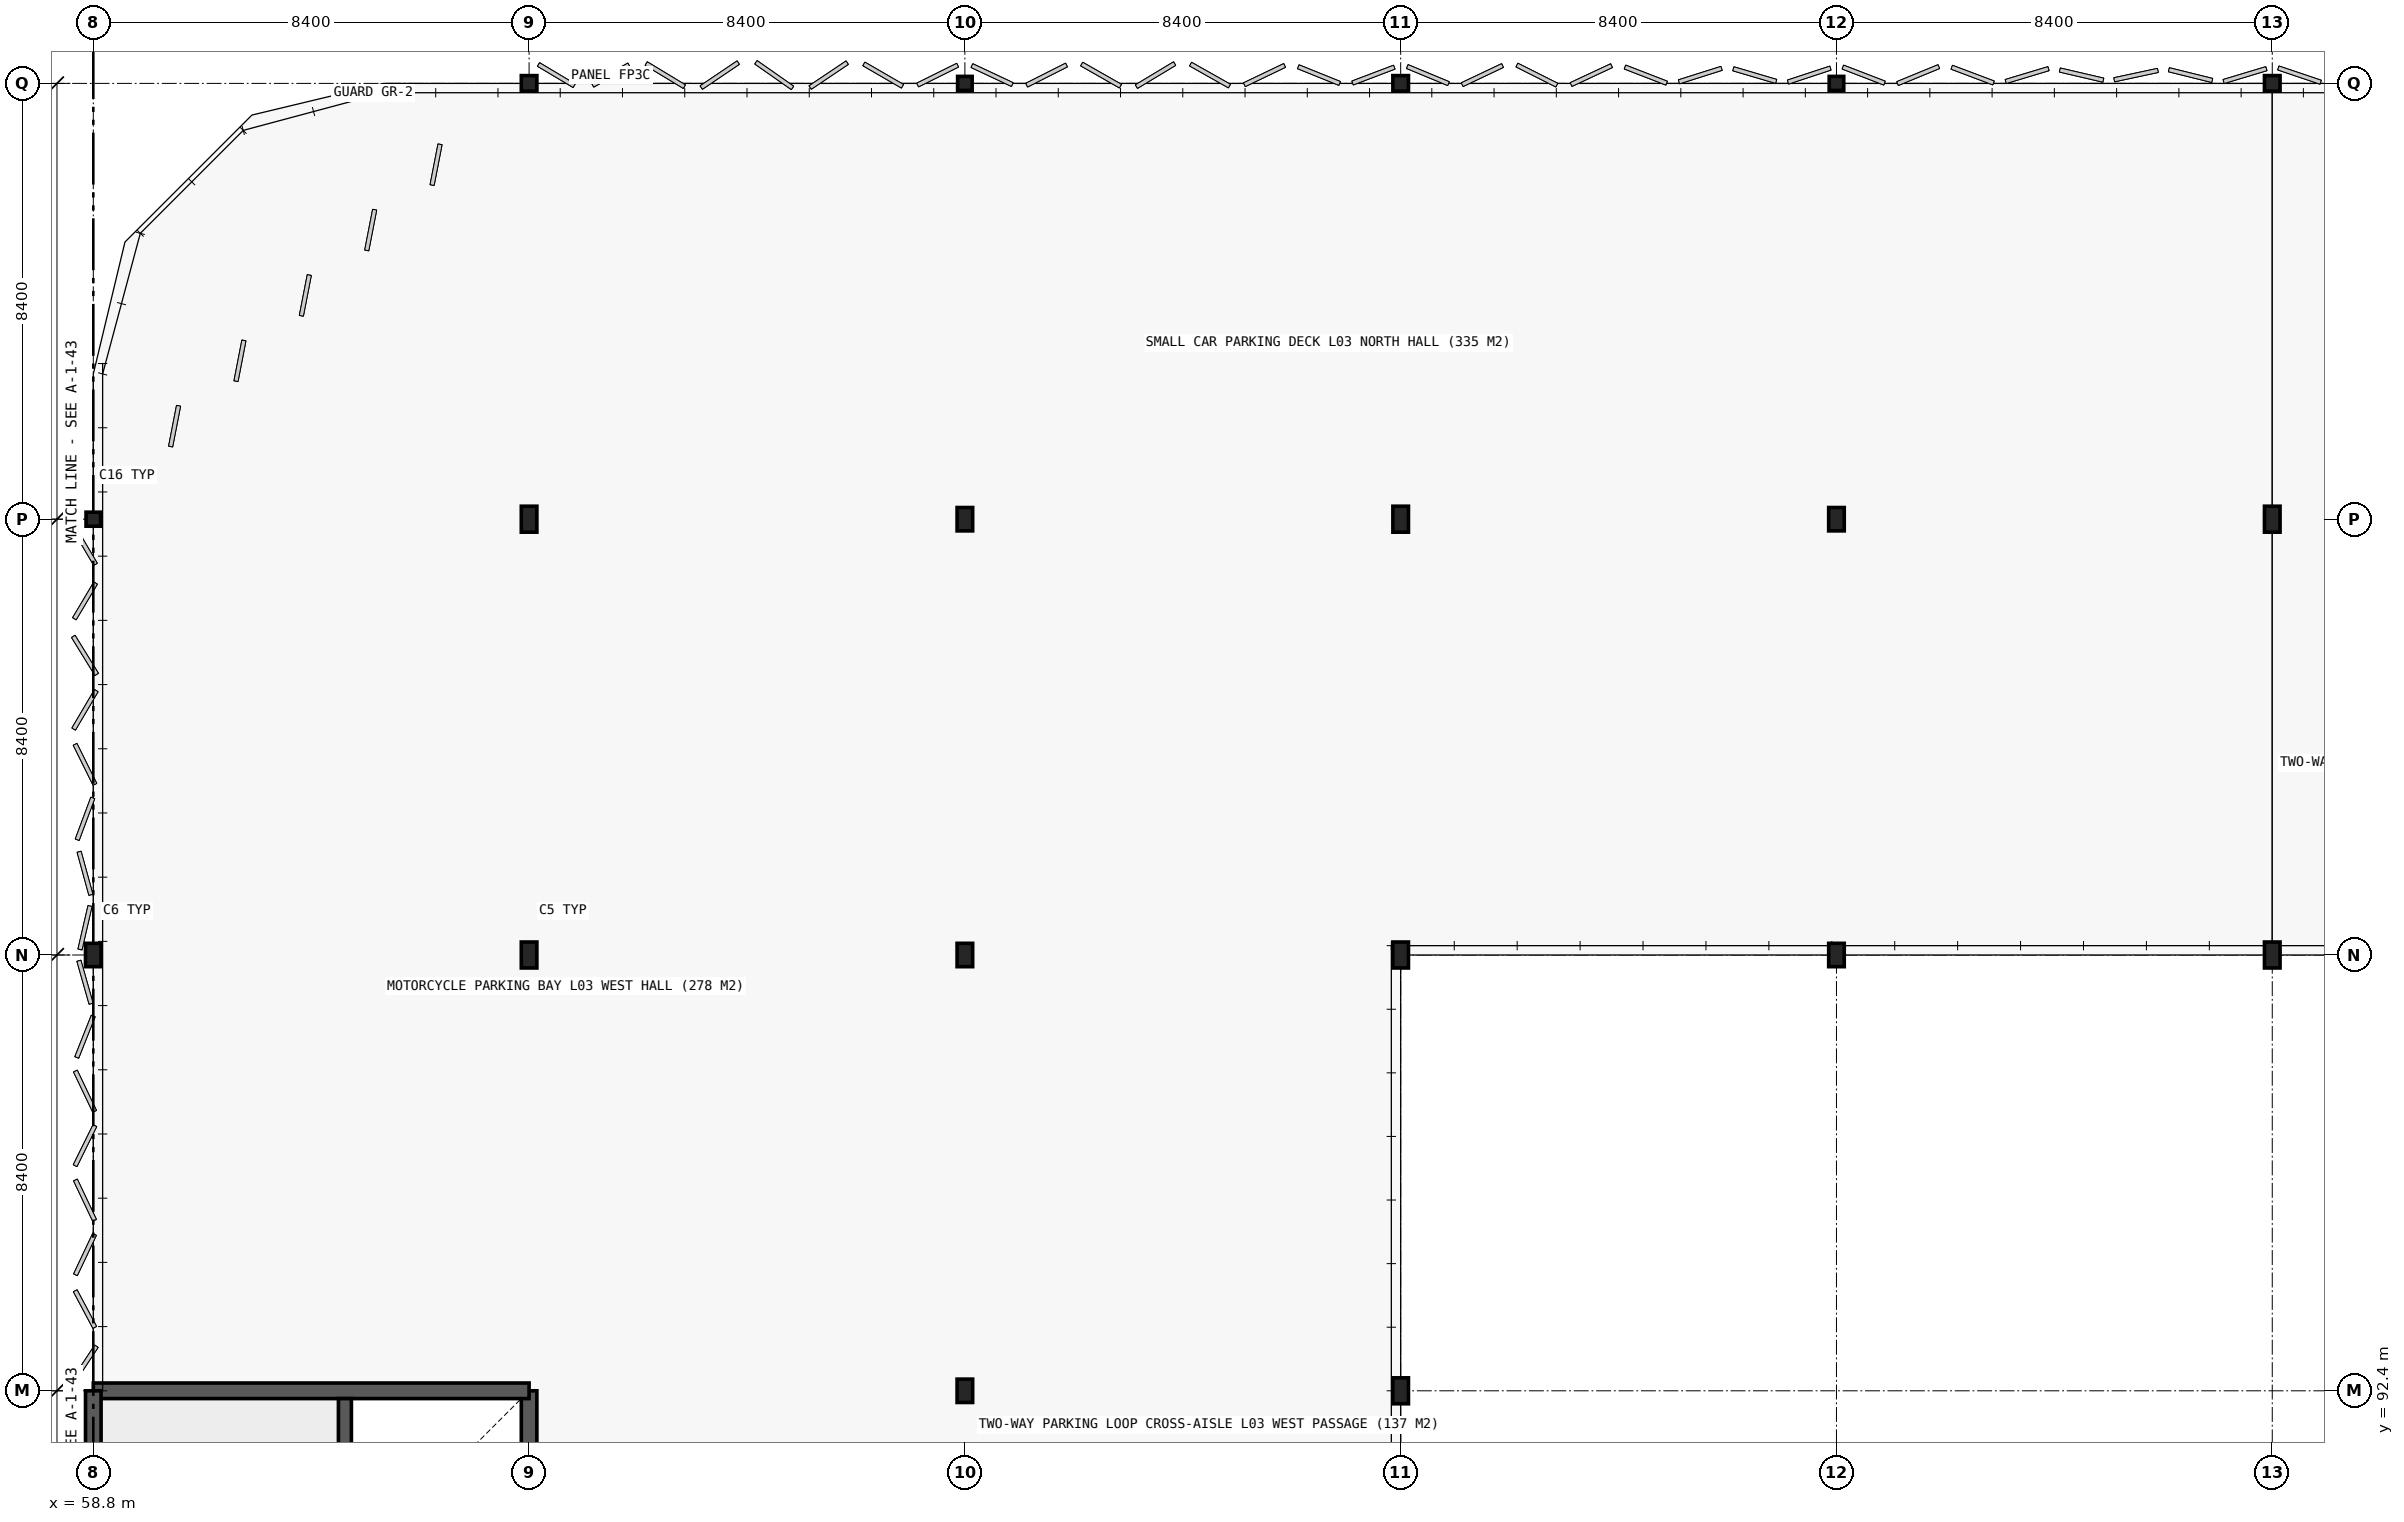
"""IFC4 building model, lengths in metres.
Left out: names, types, materials, properties, quantities, classifications, styles, units other than length and angle.
Written with IfcOpenShell. Run it as: python <this file> out.ifc"""

import sys

from ifc_helpers import new_model, si_unit, direction, frame, frame_2d, origin, origin_2d, place, context, subcontext, project, spatial, rectangle, i_section, extrude, element, save


model = new_model("IFC4")
c1 = context("Model", 3, precision=1e-05, world=origin(), true_north=direction((0.0, 1.0)))
c2 = subcontext(c1, "Body", "Model", "MODEL_VIEW")
j1 = project(units=[si_unit("LENGTHUNIT", "METRE"), si_unit("PLANEANGLEUNIT", "RADIAN")], contexts=[c1])
p1 = place(None, origin())
s1 = spatial("IfcSite", under=j1, at=p1, CompositionType="ELEMENT")
p2 = place(p1, origin())
s2 = spatial("IfcBuilding", under=s1, at=p2, CompositionType="ELEMENT")
p3 = place(p2, frame((0.0, 0.0, 13.2)))
s3 = spatial("IfcBuildingStorey", under=s2, at=p3, CompositionType="ELEMENT", Elevation=13.2)
p4 = place(p3, frame((67.2, 84.0, 0.0), z_axis=(0.0, 0.0, 1.0), x_axis=(0.0, 1.0, 0.0)))
e1 = element("IfcWall", 1, at=p4, inside=s3, PredefinedType="SHEAR", context=c2, shape_type="SweptSolid", body=[
    extrude(rectangle(XDim=8.4, YDim=0.3, at=frame_2d((4.2, 0.0))), origin(), (0.0, 0.0, 1.0), 4.2),
])
p5 = place(p4, frame((4.55, 0.0, 0.0)))
e2 = element("IfcOpeningElement", 2, at=p5, cuts=e1, PredefinedType="OPENING", context=c2, shape_type="SweptSolid", body=[
    extrude(rectangle(XDim=1.1, YDim=2.2, at=frame_2d((0.55, 1.1))), frame((0.0, 0.16, 0.0), z_axis=(0.0, -1.0, 0.0), x_axis=(1.0, 0.0, 0.0)), (0.0, 0.0, 1.0), 0.32),
])
for number, where, z_axis, x_axis in (
    (3, (67.2, 92.4, 0.0), (0.0, 0.0, 1.0), (-1.0, 0.0, 0.0)),
    (4, (58.8, 92.4, 0.0), (0.0, 0.0, 1.0), (0.0, -1.0, 0.0)),
):
    element("IfcWall", number, at=place(p3, frame(where, z_axis=z_axis, x_axis=x_axis)), inside=s3, PredefinedType="SHEAR", context=c2, shape_type="SweptSolid", body=[
        extrude(rectangle(XDim=8.4, YDim=0.3, at=frame_2d((4.2, 0.0))), origin(), (0.0, 0.0, 1.0), 4.2),
    ])
p6 = place(p3, frame((63.65, 84.15, 0.0), z_axis=(0.0, 0.0, 1.0), x_axis=(0.0, 1.0, 0.0)))
e5 = element("IfcWall", 5, at=p6, inside=s3, PredefinedType="SHEAR", context=c2, shape_type="SweptSolid", body=[
    extrude(rectangle(XDim=8.1, YDim=0.25, at=frame_2d((4.05, 0.0))), origin(), (0.0, 0.0, 1.0), 4.2),
])
p7 = place(p3, frame((58.8, 100.8, 0.0), z_axis=(0.0, 0.0, 1.0), x_axis=(1.0, 0.0, 0.0)))
e6 = element("IfcColumn", 6, at=p7, inside=s3, PredefinedType="COLUMN", context=c2, shape_type="SweptSolid", body=[
    extrude(i_section(OverallWidth=0.3, OverallDepth=0.45, WebThickness=0.014, FlangeThickness=0.026, FilletRadius=0.027, at=origin_2d()), origin(), (0.0, 0.0, 1.0), 4.2),
])
p8 = place(p3, frame((58.8, 109.2, 0.0), z_axis=(0.0, 0.0, 1.0), x_axis=(1.0, 0.0, 0.0)))
e7 = element("IfcColumn", 7, at=p8, inside=s3, PredefinedType="COLUMN", context=c2, shape_type="SweptSolid", body=[
    extrude(i_section(OverallWidth=0.28, OverallDepth=0.27, WebThickness=0.008, FlangeThickness=0.013, FilletRadius=0.024, at=origin_2d()), origin(), (0.0, 0.0, 1.0), 4.03),
])
for number, where, z_axis, x_axis in (
    (8, (67.2, 100.8, 0.0), (0.0, 0.0, 1.0), (1.0, 0.0, 0.0)),
    (9, (67.2, 109.2, 0.0), (0.0, 0.0, 1.0), (1.0, 0.0, 0.0)),
):
    element("IfcColumn", number, at=place(p3, frame(where, z_axis=z_axis, x_axis=x_axis)), inside=s3, PredefinedType="COLUMN", context=c2, shape_type="SweptSolid", body=[
        extrude(i_section(OverallWidth=0.3, OverallDepth=0.5, WebThickness=0.014, FlangeThickness=0.028, FilletRadius=0.027, at=origin_2d()), origin(), (0.0, 0.0, 1.0), 4.2),
    ])
p9 = place(p3, frame((67.2, 117.6, 0.0), z_axis=(0.0, 0.0, 1.0), x_axis=(1.0, 0.0, 0.0)))
e10 = element("IfcColumn", 10, at=p9, inside=s3, PredefinedType="COLUMN", context=c2, shape_type="SweptSolid", body=[
    extrude(i_section(OverallWidth=0.3, OverallDepth=0.3, WebThickness=0.011, FlangeThickness=0.019, FilletRadius=0.027, at=origin_2d()), origin(), (0.0, 0.0, 1.0), 3.958),
])
for number, where, z_axis, x_axis in (
    (11, (75.6, 92.4, 0.0), (0.0, 0.0, 1.0), (1.0, 0.0, 0.0)),
    (12, (75.6, 100.8, 0.0), (0.0, 0.0, 1.0), (1.0, 0.0, 0.0)),
    (13, (75.6, 109.2, 0.0), (0.0, 0.0, 1.0), (1.0, 0.0, 0.0)),
):
    element("IfcColumn", number, at=place(p3, frame(where, z_axis=z_axis, x_axis=x_axis)), inside=s3, PredefinedType="COLUMN", context=c2, shape_type="SweptSolid", body=[
        extrude(i_section(OverallWidth=0.3, OverallDepth=0.45, WebThickness=0.014, FlangeThickness=0.026, FilletRadius=0.027, at=origin_2d()), origin(), (0.0, 0.0, 1.0), 4.2),
    ])
p10 = place(p3, frame((75.6, 117.6, 0.0), z_axis=(0.0, 0.0, 1.0), x_axis=(1.0, 0.0, 0.0)))
e14 = element("IfcColumn", 14, at=p10, inside=s3, PredefinedType="COLUMN", context=c2, shape_type="SweptSolid", body=[
    extrude(i_section(OverallWidth=0.28, OverallDepth=0.27, WebThickness=0.008, FlangeThickness=0.013, FilletRadius=0.024, at=origin_2d()), origin(), (0.0, 0.0, 1.0), 3.958),
])
for number, where, z_axis, x_axis in (
    (15, (84.0, 92.4, 0.0), (0.0, 0.0, 1.0), (1.0, 0.0, 0.0)),
    (16, (84.0, 100.8, 0.0), (0.0, 0.0, 1.0), (1.0, 0.0, 0.0)),
    (17, (84.0, 109.2, 0.0), (0.0, 0.0, 1.0), (1.0, 0.0, 0.0)),
):
    element("IfcColumn", number, at=place(p3, frame(where, z_axis=z_axis, x_axis=x_axis)), inside=s3, PredefinedType="COLUMN", context=c2, shape_type="SweptSolid", body=[
        extrude(i_section(OverallWidth=0.3, OverallDepth=0.5, WebThickness=0.014, FlangeThickness=0.028, FilletRadius=0.027, at=origin_2d()), origin(), (0.0, 0.0, 1.0), 4.2),
    ])
p11 = place(p3, frame((84.0, 117.6, 0.0), z_axis=(0.0, 0.0, 1.0), x_axis=(1.0, 0.0, 0.0)))
e18 = element("IfcColumn", 18, at=p11, inside=s3, PredefinedType="COLUMN", context=c2, shape_type="SweptSolid", body=[
    extrude(i_section(OverallWidth=0.3, OverallDepth=0.3, WebThickness=0.011, FlangeThickness=0.019, FilletRadius=0.027, at=origin_2d()), origin(), (0.0, 0.0, 1.0), 3.958),
])
for number, where, z_axis, x_axis in (
    (19, (92.4, 100.8, 0.0), (0.0, 0.0, 1.0), (1.0, 0.0, 0.0)),
    (20, (92.4, 109.2, 0.0), (0.0, 0.0, 1.0), (1.0, 0.0, 0.0)),
):
    element("IfcColumn", number, at=place(p3, frame(where, z_axis=z_axis, x_axis=x_axis)), inside=s3, PredefinedType="COLUMN", context=c2, shape_type="SweptSolid", body=[
        extrude(i_section(OverallWidth=0.3, OverallDepth=0.45, WebThickness=0.014, FlangeThickness=0.026, FilletRadius=0.027, at=origin_2d()), origin(), (0.0, 0.0, 1.0), 4.2),
    ])
p12 = place(p3, frame((92.4, 117.6, 0.0), z_axis=(0.0, 0.0, 1.0), x_axis=(1.0, 0.0, 0.0)))
e21 = element("IfcColumn", 21, at=p12, inside=s3, PredefinedType="COLUMN", context=c2, shape_type="SweptSolid", body=[
    extrude(i_section(OverallWidth=0.28, OverallDepth=0.27, WebThickness=0.008, FlangeThickness=0.013, FilletRadius=0.024, at=origin_2d()), origin(), (0.0, 0.0, 1.0), 3.958),
])
for number, where, z_axis, x_axis in (
    (22, (100.8, 100.8, 0.0), (0.0, 0.0, 1.0), (1.0, 0.0, 0.0)),
    (23, (100.8, 109.2, 0.0), (0.0, 0.0, 1.0), (1.0, 0.0, 0.0)),
):
    element("IfcColumn", number, at=place(p3, frame(where, z_axis=z_axis, x_axis=x_axis)), inside=s3, PredefinedType="COLUMN", context=c2, shape_type="SweptSolid", body=[
        extrude(i_section(OverallWidth=0.3, OverallDepth=0.5, WebThickness=0.014, FlangeThickness=0.028, FilletRadius=0.027, at=origin_2d()), origin(), (0.0, 0.0, 1.0), 4.2),
    ])
p13 = place(p3, frame((100.8, 117.6, 0.0), z_axis=(0.0, 0.0, 1.0), x_axis=(1.0, 0.0, 0.0)))
e24 = element("IfcColumn", 24, at=p13, inside=s3, PredefinedType="COLUMN", context=c2, shape_type="SweptSolid", body=[
    extrude(i_section(OverallWidth=0.3, OverallDepth=0.3, WebThickness=0.011, FlangeThickness=0.019, FilletRadius=0.027, at=origin_2d()), origin(), (0.0, 0.0, 1.0), 3.958),
])
save(model, sys.argv[1])
